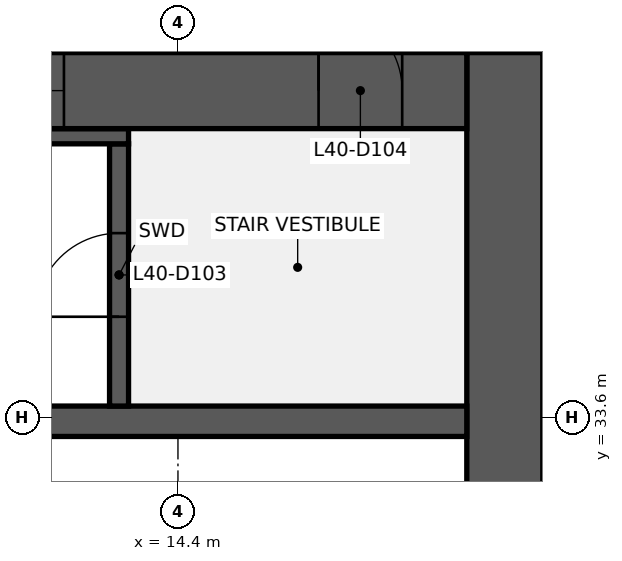
"""IFC4 building model, lengths in metres.
Left out: names, types, materials, properties, quantities, classifications, styles, units other than length and angle.
Written with IfcOpenShell. Run it as: python <this file> out.ifc"""

import sys

from ifc_helpers import new_model, si_unit, direction, frame, frame_2d, origin, place, context, subcontext, project, spatial, rectangle, extrude, element, fill, save


model = new_model("IFC4")
c1 = context("Model", 3, precision=1e-05, world=origin(), true_north=direction((0.0, 1.0)))
c2 = subcontext(c1, "Body", "Model", "MODEL_VIEW")
j1 = project(units=[si_unit("LENGTHUNIT", "METRE"), si_unit("PLANEANGLEUNIT", "RADIAN")], contexts=[c1])
p1 = place(None, origin())
s1 = spatial("IfcSite", under=j1, at=p1, CompositionType="ELEMENT")
p2 = place(p1, origin())
s2 = spatial("IfcBuilding", under=s1, at=p2, CompositionType="ELEMENT")
p3 = place(p2, frame((0.0, 0.0, 180.6)))
s3 = spatial("IfcBuildingStorey", under=s2, at=p3, CompositionType="ELEMENT", Elevation=180.6)
p4 = place(p3, frame((18.7, 38.4, 0.0), z_axis=(0.0, 0.0, 1.0), x_axis=(0.0, -1.0, 0.0)))
e1 = element("IfcWall", 1, at=p4, inside=s3, PredefinedType="SHEAR", context=c2, shape_type="SweptSolid", body=[
    extrude(rectangle(XDim=28.8, YDim=1.0, at=frame_2d((14.4, 0.0))), origin(), (0.0, 0.0, 1.0), 12.3),
])
p5 = place(p4, frame((18.3, 0.0, 0.0)))
e2 = element("IfcOpeningElement", 2, at=p5, cuts=e1, PredefinedType="OPENING", context=c2, shape_type="SweptSolid", body=[
    extrude(rectangle(XDim=1.8, YDim=2.1, at=frame_2d((0.9, 1.05))), frame((0.0, 0.51, 0.0), z_axis=(0.0, -1.0, 0.0), x_axis=(1.0, 0.0, 0.0)), (0.0, 0.0, 1.0), 1.02),
])
p6 = place(p4, frame((8.7, 0.0, 0.0)))
e3 = element("IfcOpeningElement", 3, at=p6, cuts=e1, PredefinedType="OPENING", context=c2, shape_type="SweptSolid", body=[
    extrude(rectangle(XDim=1.8, YDim=2.1, at=frame_2d((0.9, 1.05))), frame((0.0, 0.51, 0.0), z_axis=(0.0, -1.0, 0.0), x_axis=(1.0, 0.0, 0.0)), (0.0, 0.0, 1.0), 1.02),
])
p7 = place(p3, frame((1.0, 33.55, 0.0), z_axis=(0.0, 0.0, 1.0), x_axis=(1.0, 0.0, 0.0)))
e4 = element("IfcWall", 4, at=p7, inside=s3, PredefinedType="SHEAR", context=c2, shape_type="SweptSolid", body=[
    extrude(rectangle(XDim=17.2, YDim=0.4, at=frame_2d((8.6, 0.0))), origin(), (0.0, 0.0, 1.0), 12.3),
])
p8 = place(p3, frame((13.625, 33.75, 0.0), z_axis=(0.0, 0.0, 1.0), x_axis=(0.0, 1.0, 0.0)))
e5 = element("IfcWall", 5, at=p8, inside=s3, PredefinedType="SHEAR", context=c2, shape_type="SweptSolid", body=[
    extrude(rectangle(XDim=3.45, YDim=0.25, at=frame_2d((1.725, 0.0))), origin(), (0.0, 0.0, 1.0), 12.3),
])
p9 = place(p8, frame((1.175, 0.0, 0.0)))
e6 = element("IfcOpeningElement", 6, at=p9, cuts=e5, PredefinedType="OPENING", context=c2, shape_type="SweptSolid", body=[
    extrude(rectangle(XDim=1.1, YDim=2.1, at=frame_2d((0.55, 1.05))), frame((0.0, 0.135, 0.0), z_axis=(0.0, -1.0, 0.0), x_axis=(1.0, 0.0, 0.0)), (0.0, 0.0, 1.0), 0.27),
])
p10 = place(p3, frame((6.25, 37.3, 0.0), z_axis=(0.0, 0.0, 1.0), x_axis=(1.0, 0.0, 0.0)))
e7 = element("IfcWall", 7, at=p10, inside=s3, PredefinedType="SHEAR", context=c2, shape_type="SweptSolid", body=[
    extrude(rectangle(XDim=7.5, YDim=0.2, at=frame_2d((3.75, 0.0))), origin(), (0.0, 0.0, 1.0), 12.3),
])
p11 = place(p3, frame((1.0, 37.9, 0.0), z_axis=(0.0, 0.0, 1.0), x_axis=(1.0, 0.0, 0.0)))
e8 = element("IfcWall", 8, at=p11, inside=s3, PredefinedType="SHEAR", context=c2, shape_type="SweptSolid", body=[
    extrude(rectangle(XDim=17.2, YDim=1.0, at=frame_2d((8.6, 0.0))), origin(), (0.0, 0.0, 1.0), 12.3),
])
p12 = place(p11, frame((15.25, 0.0, 0.0)))
e9 = element("IfcOpeningElement", 9, at=p12, cuts=e8, PredefinedType="OPENING", context=c2, shape_type="SweptSolid", body=[
    extrude(rectangle(XDim=1.1, YDim=2.1, at=frame_2d((0.55, 1.05))), frame((0.0, 0.51, 0.0), z_axis=(0.0, -1.0, 0.0), x_axis=(1.0, 0.0, 0.0)), (0.0, 0.0, 1.0), 1.02),
])
p13 = place(p11, frame((5.3, 0.0, 0.9)))
e10 = element("IfcOpeningElement", 10, at=p13, cuts=e8, PredefinedType="OPENING", context=c2, shape_type="SweptSolid", body=[
    extrude(rectangle(XDim=1.8, YDim=1.5, at=frame_2d((0.9, 0.75))), frame((0.0, 0.51, 0.0), z_axis=(0.0, -1.0, 0.0), x_axis=(1.0, 0.0, 0.0)), (0.0, 0.0, 1.0), 1.02),
])
p14 = place(p11, frame((10.1, 0.0, 0.9)))
e11 = element("IfcOpeningElement", 11, at=p14, cuts=e8, PredefinedType="OPENING", context=c2, shape_type="SweptSolid", body=[
    extrude(rectangle(XDim=1.8, YDim=1.5, at=frame_2d((0.9, 0.75))), frame((0.0, 0.51, 0.0), z_axis=(0.0, -1.0, 0.0), x_axis=(1.0, 0.0, 0.0)), (0.0, 0.0, 1.0), 1.02),
])
p15 = place(p9, origin())
e12 = element("IfcDoor", 12, at=p15, inside=s3, OperationType="SINGLE_SWING_LEFT", PredefinedType="DOOR", context=c2, shape_type="SweptSolid", body=[
    extrude(rectangle(XDim=1.1, YDim=2.1, at=frame_2d((0.55, 1.05))), frame((0.0, 0.025, 0.0), z_axis=(0.0, -1.0, 0.0), x_axis=(1.0, 0.0, 0.0)), (0.0, 0.0, 1.0), 0.05),
])
fill(e6, e12)
p16 = place(p12, origin())
e13 = element("IfcDoor", 13, at=p16, inside=s3, OperationType="SINGLE_SWING_LEFT", PredefinedType="DOOR", context=c2, shape_type="SweptSolid", body=[
    extrude(rectangle(XDim=1.1, YDim=2.1, at=frame_2d((0.55, 1.05))), frame((0.0, 0.025, 0.0), z_axis=(0.0, -1.0, 0.0), x_axis=(1.0, 0.0, 0.0)), (0.0, 0.0, 1.0), 0.05),
])
fill(e9, e13)
p17 = place(p14, origin())
e14 = element("IfcWindow", 14, at=p17, inside=s3, PartitioningType="SINGLE_PANEL", PredefinedType="WINDOW", context=c2, shape_type="SweptSolid", body=[
    extrude(rectangle(XDim=1.8, YDim=1.5, at=frame_2d((0.9, 0.75))), frame((0.0, 0.03, 0.0), z_axis=(0.0, -1.0, 0.0), x_axis=(1.0, 0.0, 0.0)), (0.0, 0.0, 1.0), 0.06),
])
fill(e11, e14)
save(model, sys.argv[1])
